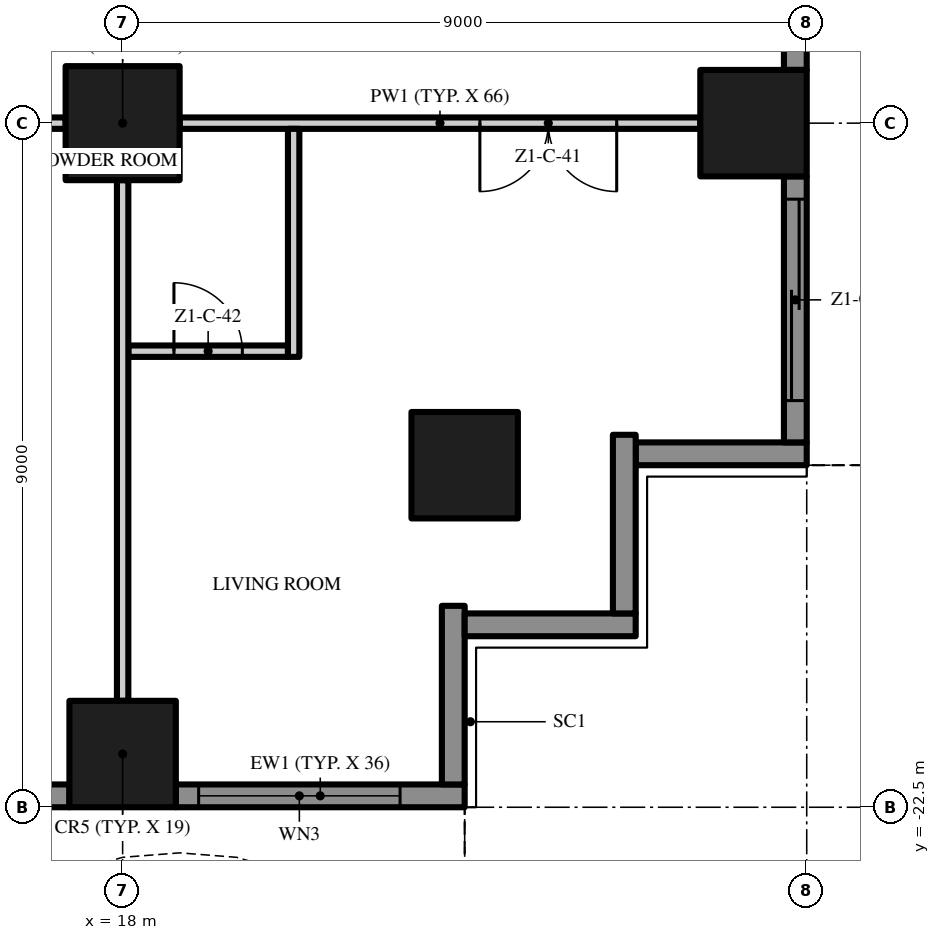
"""IFC4 building model, lengths in metres.
Left out: names, types, materials, properties, quantities, classifications, styles, units other than length and angle.
Written with IfcOpenShell. Run it as: python <this file> out.ifc"""

import sys

from ifc_helpers import new_model, si_unit, direction, frame, frame_2d, origin, origin_2d, place, context, subcontext, project, spatial, polyline, rectangle, outline, extrude, element, fill, save


model = new_model("IFC4")
c1 = context("Model", 3, precision=1e-05, world=origin(), true_north=direction((0.0, 1.0)))
c2 = subcontext(c1, "Body", "Model", "MODEL_VIEW")
j1 = project(units=[si_unit("LENGTHUNIT", "METRE"), si_unit("PLANEANGLEUNIT", "RADIAN")], contexts=[c1])
p1 = place(None, origin())
s1 = spatial("IfcSite", under=j1, at=p1, CompositionType="ELEMENT")
p2 = place(p1, origin())
s2 = spatial("IfcBuilding", under=s1, at=p2, CompositionType="ELEMENT")
p3 = place(p2, frame((0.0, 0.0, 45.4)))
s3 = spatial("IfcBuildingStorey", under=s2, at=p3, CompositionType="ELEMENT", Elevation=45.4)
p4 = place(p3, frame((18.0, -13.5, 0.0), z_axis=(0.0, 0.0, 1.0), x_axis=(1.0, 0.0, 0.0)))
e1 = element("IfcColumn", 1, at=p4, inside=s3, PredefinedType="COLUMN", context=c2, shape_type="SweptSolid", body=[
    extrude(rectangle(XDim=1.5, YDim=1.5, at=origin_2d()), origin(), (0.0, 0.0, 1.0), 3.5),
])
for number, where, z_axis, x_axis in (
    (2, (18.0, -21.8, 0.0), (0.0, 0.0, 1.0), (1.0, 0.0, 0.0)),
    (3, (26.3, -13.5, 0.0), (0.0, 0.0, 1.0), (1.0, 0.0, 0.0)),
    (4, (22.5, -18.0, 0.0), (0.0, 0.0, 1.0), (1.0, 0.0, 0.0)),
):
    element("IfcColumn", number, at=place(p3, frame(where, z_axis=z_axis, x_axis=x_axis)), inside=s3, PredefinedType="COLUMN", context=c2, shape_type="SweptSolid", body=[
        extrude(rectangle(XDim=1.4, YDim=1.4, at=origin_2d()), origin(), (0.0, 0.0, 1.0), 3.5),
    ])
p5 = place(p3, frame((17.3, -22.35, 0.0), z_axis=(0.0, 0.0, 1.0), x_axis=(-1.0, 0.0, 0.0)))
e5 = element("IfcWall", 5, at=p5, inside=s3, PredefinedType="SOLIDWALL", context=c2, shape_type="SweptSolid", body=[
    extrude(rectangle(XDim=7.6, YDim=0.3, at=frame_2d((3.8, 0.0))), origin(), (0.0, 0.0, 1.0), 3.5),
])
p6 = place(p5, frame((4.65, 0.0, 0.0)))
e6 = element("IfcOpeningElement", 6, at=p6, cuts=e5, PredefinedType="OPENING", context=c2, shape_type="SweptSolid", body=[
    extrude(rectangle(XDim=2.65, YDim=2.4, at=frame_2d((1.325, 1.2))), frame((0.0, 0.16, 0.0), z_axis=(0.0, -1.0, 0.0), x_axis=(1.0, 0.0, 0.0)), (0.0, 0.0, 1.0), 0.32),
])
p7 = place(p5, frame((0.3, 0.0, 0.45)))
e7 = element("IfcOpeningElement", 7, at=p7, cuts=e5, PredefinedType="OPENING", context=c2, shape_type="SweptSolid", body=[
    extrude(rectangle(XDim=2.65, YDim=2.65, at=frame_2d((1.325, 1.325))), frame((0.0, 0.16, 0.0), z_axis=(0.0, -1.0, 0.0), x_axis=(1.0, 0.0, 0.0)), (0.0, 0.0, 1.0), 0.32),
])
p8 = place(p3, frame((22.5, -22.35, 0.0), z_axis=(0.0, 0.0, 1.0), x_axis=(-1.0, 0.0, 0.0)))
e8 = element("IfcWall", 8, at=p8, inside=s3, PredefinedType="SOLIDWALL", context=c2, shape_type="SweptSolid", body=[
    extrude(rectangle(XDim=3.8, YDim=0.3, at=frame_2d((1.9, 0.0))), origin(), (0.0, 0.0, 1.0), 3.5),
])
p9 = place(p8, frame((0.85, 0.0, 0.45)))
e9 = element("IfcOpeningElement", 9, at=p9, cuts=e8, PredefinedType="OPENING", context=c2, shape_type="SweptSolid", body=[
    extrude(rectangle(XDim=2.65, YDim=2.65, at=frame_2d((1.325, 1.325))), frame((0.0, 0.16, 0.0), z_axis=(0.0, -1.0, 0.0), x_axis=(1.0, 0.0, 0.0)), (0.0, 0.0, 1.0), 0.32),
])
p10 = place(p3, frame((22.35, -19.85, 0.0), z_axis=(0.0, 0.0, 1.0), x_axis=(0.0, -1.0, 0.0)))
e10 = element("IfcWall", 10, at=p10, inside=s3, PredefinedType="SOLIDWALL", context=c2, shape_type="SweptSolid", body=[
    extrude(rectangle(XDim=2.35, YDim=0.3, at=frame_2d((1.175, 0.0))), origin(), (0.0, 0.0, 1.0), 3.5),
])
p11 = place(p3, frame((24.75, -20.1, 0.0), z_axis=(0.0, 0.0, 1.0), x_axis=(-1.0, 0.0, 0.0)))
e11 = element("IfcWall", 11, at=p11, inside=s3, PredefinedType="SOLIDWALL", context=c2, shape_type="SweptSolid", body=[
    extrude(rectangle(XDim=2.25, YDim=0.3, at=frame_2d((1.125, 0.0))), origin(), (0.0, 0.0, 1.0), 3.5),
])
p12 = place(p3, frame((24.6, -17.6, 0.0), z_axis=(0.0, 0.0, 1.0), x_axis=(0.0, -1.0, 0.0)))
e12 = element("IfcWall", 12, at=p12, inside=s3, PredefinedType="SOLIDWALL", context=c2, shape_type="SweptSolid", body=[
    extrude(rectangle(XDim=2.35, YDim=0.3, at=frame_2d((1.175, 0.0))), origin(), (0.0, 0.0, 1.0), 3.5),
])
p13 = place(p3, frame((27.0, -17.85, 0.0), z_axis=(0.0, 0.0, 1.0), x_axis=(-1.0, 0.0, 0.0)))
e13 = element("IfcWall", 13, at=p13, inside=s3, PredefinedType="SOLIDWALL", context=c2, shape_type="SweptSolid", body=[
    extrude(rectangle(XDim=2.25, YDim=0.3, at=frame_2d((1.125, 0.0))), origin(), (0.0, 0.0, 1.0), 3.5),
])
p14 = place(p3, frame((26.85, -14.2, 0.0), z_axis=(0.0, 0.0, 1.0), x_axis=(0.0, -1.0, 0.0)))
e14 = element("IfcWall", 14, at=p14, inside=s3, PredefinedType="SOLIDWALL", context=c2, shape_type="SweptSolid", body=[
    extrude(rectangle(XDim=3.5, YDim=0.3, at=frame_2d((1.75, 0.0))), origin(), (0.0, 0.0, 1.0), 3.5),
])
p15 = place(p14, frame((0.3, 0.0, 0.0)))
e15 = element("IfcOpeningElement", 15, at=p15, cuts=e14, PredefinedType="OPENING", context=c2, shape_type="SweptSolid", body=[
    extrude(rectangle(XDim=2.65, YDim=2.4, at=frame_2d((1.325, 1.2))), frame((0.0, 0.16, 0.0), z_axis=(0.0, -1.0, 0.0), x_axis=(1.0, 0.0, 0.0)), (0.0, 0.0, 1.0), 0.32),
])
p16 = place(p3, frame((26.85, -5.2, 0.0), z_axis=(0.0, 0.0, 1.0), x_axis=(0.0, -1.0, 0.0)))
e16 = element("IfcWall", 16, at=p16, inside=s3, PredefinedType="SOLIDWALL", context=c2, shape_type="SweptSolid", body=[
    extrude(rectangle(XDim=7.6, YDim=0.3, at=frame_2d((3.8, 0.0))), origin(), (0.0, 0.0, 1.0), 3.5),
])
p17 = place(p16, frame((4.65, 0.0, 0.45)))
e17 = element("IfcOpeningElement", 17, at=p17, cuts=e16, PredefinedType="OPENING", context=c2, shape_type="SweptSolid", body=[
    extrude(rectangle(XDim=2.65, YDim=2.65, at=frame_2d((1.325, 1.325))), frame((0.0, 0.16, 0.0), z_axis=(0.0, -1.0, 0.0), x_axis=(1.0, 0.0, 0.0)), (0.0, 0.0, 1.0), 0.32),
])
p18 = place(p16, frame((0.3, 0.0, 0.45)))
e18 = element("IfcOpeningElement", 18, at=p18, cuts=e16, PredefinedType="OPENING", context=c2, shape_type="SweptSolid", body=[
    extrude(rectangle(XDim=2.65, YDim=2.65, at=frame_2d((1.325, 1.325))), frame((0.0, 0.16, 0.0), z_axis=(0.0, -1.0, 0.0), x_axis=(1.0, 0.0, 0.0)), (0.0, 0.0, 1.0), 0.32),
])
p19 = place(p3, origin())
e19 = element("IfcWall", 19, at=p19, inside=s3, PredefinedType="USERDEFINED", context=c2, shape_type="SweptSolid", body=[
    extrude(outline(polyline([(-22.5, -24.3), (-21.0, -25.005), (-19.5, -25.441), (-18.75, -25.5), (-18.0, -25.441), (-16.5, -25.005), (-15.0, -24.3), (-13.5, -23.595), (-12.0, -23.159), (-11.25, -23.1), (-10.5, -23.159), (-9.0, -23.595), (-7.5, -24.3), (-6.0, -25.005), (-4.5, -25.441), (-3.75, -25.5), (-3.0, -25.441), (-1.5, -25.005), (0.0, -24.3), (1.5, -23.595), (3.0, -23.159), (3.75, -23.1), (4.5, -23.159), (6.0, -23.595), (7.5, -24.3), (9.0, -25.005), (10.5, -25.441), (11.25, -25.5), (12.0, -25.441), (13.5, -25.005), (15.0, -24.3), (16.5, -23.595), (18.0, -23.159), (18.75, -23.1), (19.5, -23.159), (21.0, -23.595), (22.5, -24.3), (22.606, -24.074), (21.089, -23.36), (19.545, -22.911), (18.75, -22.849), (17.955, -22.911), (16.411, -23.36), (14.894, -24.074), (13.411, -24.771), (11.955, -25.194), (11.25, -25.249), (10.545, -25.194), (9.089, -24.771), (7.606, -24.074), (6.089, -23.36), (4.545, -22.911), (3.75, -22.849), (2.955, -22.911), (1.411, -23.36), (-0.106, -24.074), (-1.589, -24.771), (-3.045, -25.194), (-3.75, -25.249), (-4.455, -25.194), (-5.911, -24.771), (-7.394, -24.074), (-8.911, -23.36), (-10.455, -22.911), (-11.25, -22.849), (-12.045, -22.911), (-13.589, -23.36), (-15.106, -24.074), (-16.589, -24.771), (-18.045, -25.194), (-18.75, -25.249), (-19.455, -25.194), (-20.911, -24.771), (-22.394, -24.074), (-22.5, -24.3)])), origin(), (0.0, 0.0, 1.0), 0.9),
])
p20 = place(p3, origin())
e20 = element("IfcWall", 20, at=p20, inside=s3, PredefinedType="USERDEFINED", context=c2, shape_type="SweptSolid", body=[
    extrude(outline(polyline([(28.8, -18.0), (29.505, -16.5), (29.941, -15.0), (30.0, -14.25), (29.941, -13.5), (29.505, -12.0), (28.8, -10.5), (28.095, -9.0), (27.659, -7.5), (27.6, -6.75), (27.659, -6.0), (28.095, -4.5), (28.8, -3.0), (29.505, -1.5), (29.941, 0.0), (30.0, 0.75), (29.941, 1.5), (29.505, 3.0), (28.8, 4.5), (28.095, 6.0), (27.659, 7.5), (27.6, 8.25), (27.659, 9.0), (28.095, 10.5), (28.8, 12.0), (29.505, 13.5), (29.941, 15.0), (30.0, 15.75), (29.941, 16.5), (29.505, 18.0), (29.265, 17.93), (29.694, 16.455), (29.749, 15.75), (29.694, 15.045), (29.271, 13.589), (28.574, 12.106), (27.86, 10.589), (27.411, 9.045), (27.349, 8.25), (27.411, 7.455), (27.86, 5.911), (28.574, 4.394), (29.271, 2.911), (29.694, 1.455), (29.749, 0.75), (29.694, 0.045), (29.271, -1.411), (28.574, -2.894), (27.86, -4.411), (27.411, -5.955), (27.349, -6.75), (27.411, -7.545), (27.86, -9.089), (28.574, -10.606), (29.271, -12.089), (29.694, -13.545), (29.749, -14.25), (29.694, -14.955), (29.271, -16.411), (28.574, -17.894), (28.8, -18.0)])), origin(), (0.0, 0.0, 1.0), 0.9),
])
p21 = place(p3, frame((18.075, -16.5, 0.0), z_axis=(0.0, 0.0, 1.0), x_axis=(1.0, 0.0, 0.0)))
e21 = element("IfcWall", 21, at=p21, inside=s3, PredefinedType="PARTITIONING", context=c2, shape_type="SweptSolid", body=[
    extrude(rectangle(XDim=2.1, YDim=0.15, at=frame_2d((1.05, 0.0))), origin(), (0.0, 0.0, 1.0), 3.5),
])
p22 = place(p21, frame((0.6, 0.0, 0.0)))
e22 = element("IfcOpeningElement", 22, at=p22, cuts=e21, PredefinedType="OPENING", context=c2, shape_type="SweptSolid", body=[
    extrude(rectangle(XDim=0.9, YDim=2.1, at=frame_2d((0.45, 1.05))), frame((0.0, 0.085, 0.0), z_axis=(0.0, -1.0, 0.0), x_axis=(1.0, 0.0, 0.0)), (0.0, 0.0, 1.0), 0.17),
])
p23 = place(p3, frame((17.25, -13.5, 0.0), z_axis=(0.0, 0.0, 1.0), x_axis=(-1.0, 0.0, 0.0)))
e23 = element("IfcWall", 23, at=p23, inside=s3, PredefinedType="PARTITIONING", context=c2, shape_type="SweptSolid", body=[
    extrude(rectangle(XDim=7.5, YDim=0.15, at=frame_2d((3.75, 0.0))), origin(), (0.0, 0.0, 1.0), 3.5),
])
p24 = place(p23, frame((5.25, 0.0, 0.0)))
e24 = element("IfcOpeningElement", 24, at=p24, cuts=e23, PredefinedType="OPENING", context=c2, shape_type="SweptSolid", body=[
    extrude(rectangle(XDim=1.5, YDim=2.4, at=frame_2d((0.75, 1.2))), frame((0.0, 0.085, 0.0), z_axis=(0.0, -1.0, 0.0), x_axis=(1.0, 0.0, 0.0)), (0.0, 0.0, 1.0), 0.17),
])
p25 = place(p3, frame((25.6, -13.5, 0.0), z_axis=(0.0, 0.0, 1.0), x_axis=(-1.0, 0.0, 0.0)))
e25 = element("IfcWall", 25, at=p25, inside=s3, PredefinedType="PARTITIONING", context=c2, shape_type="SweptSolid", body=[
    extrude(rectangle(XDim=6.85, YDim=0.15, at=frame_2d((3.425, 0.0))), origin(), (0.0, 0.0, 1.0), 3.5),
])
p26 = place(p25, frame((1.1, 0.0, 0.0)))
e26 = element("IfcOpeningElement", 26, at=p26, cuts=e25, PredefinedType="OPENING", context=c2, shape_type="SweptSolid", body=[
    extrude(rectangle(XDim=1.8, YDim=2.4, at=frame_2d((0.9, 1.2))), frame((0.0, 0.085, 0.0), z_axis=(0.0, -1.0, 0.0), x_axis=(1.0, 0.0, 0.0)), (0.0, 0.0, 1.0), 0.17),
])
p27 = place(p3, frame((18.0, -21.1, 0.0), z_axis=(0.0, 0.0, 1.0), x_axis=(0.0, 1.0, 0.0)))
e27 = element("IfcWall", 27, at=p27, inside=s3, PredefinedType="PARTITIONING", context=c2, shape_type="SweptSolid", body=[
    extrude(rectangle(XDim=6.85, YDim=0.15, at=frame_2d((3.425, 0.0))), origin(), (0.0, 0.0, 1.0), 3.5),
])
p28 = place(p3, frame((20.25, -16.575, 0.0), z_axis=(0.0, 0.0, 1.0), x_axis=(0.0, 1.0, 0.0)))
e28 = element("IfcWall", 28, at=p28, inside=s3, PredefinedType="PARTITIONING", context=c2, shape_type="SweptSolid", body=[
    extrude(rectangle(XDim=3.0, YDim=0.15, at=frame_2d((1.5, 0.0))), origin(), (0.0, 0.0, 1.0), 3.5),
])
p29 = place(p9, origin())
e29 = element("IfcWindow", 29, at=p29, inside=s3, PartitioningType="SINGLE_PANEL", PredefinedType="WINDOW", context=c2, shape_type="SweptSolid", body=[
    extrude(rectangle(XDim=2.65, YDim=2.65, at=frame_2d((1.325, 1.325))), frame((0.0, 0.03, 0.0), z_axis=(0.0, -1.0, 0.0), x_axis=(1.0, 0.0, 0.0)), (0.0, 0.0, 1.0), 0.06),
])
fill(e9, e29)
p30 = place(p15, origin())
e30 = element("IfcDoor", 30, at=p30, inside=s3, OperationType="SINGLE_SWING_LEFT", PredefinedType="DOOR", context=c2, shape_type="SweptSolid", body=[
    extrude(rectangle(XDim=2.65, YDim=2.4, at=frame_2d((1.325, 1.2))), frame((0.0, 0.025, 0.0), z_axis=(0.0, -1.0, 0.0), x_axis=(1.0, 0.0, 0.0)), (0.0, 0.0, 1.0), 0.05),
])
fill(e15, e30)
p31 = place(p26, origin())
e31 = element("IfcDoor", 31, at=p31, inside=s3, OperationType="DOUBLE_DOOR_SINGLE_SWING", PredefinedType="DOOR", context=c2, shape_type="SweptSolid", body=[
    extrude(rectangle(XDim=1.8, YDim=2.4, at=frame_2d((0.9, 1.2))), frame((0.0, 0.025, 0.0), z_axis=(0.0, -1.0, 0.0), x_axis=(1.0, 0.0, 0.0)), (0.0, 0.0, 1.0), 0.05),
])
fill(e26, e31)
p32 = place(p22, origin())
e32 = element("IfcDoor", 32, at=p32, inside=s3, OperationType="SINGLE_SWING_LEFT", PredefinedType="DOOR", context=c2, shape_type="SweptSolid", body=[
    extrude(rectangle(XDim=0.9, YDim=2.1, at=frame_2d((0.45, 1.05))), frame((0.0, 0.025, 0.0), z_axis=(0.0, -1.0, 0.0), x_axis=(1.0, 0.0, 0.0)), (0.0, 0.0, 1.0), 0.05),
])
fill(e22, e32)
save(model, sys.argv[1])
